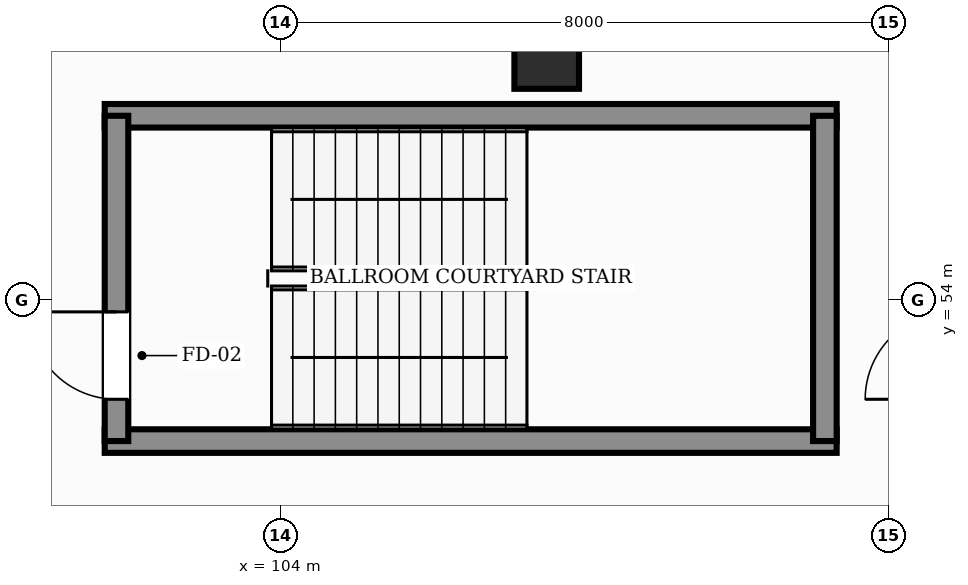
"""IFC4 building model, lengths in metres.
Left out: names, types, materials, properties, quantities, classifications, styles, units other than length and angle.
Written with IfcOpenShell. Run it as: python <this file> out.ifc"""

import sys

from ifc_helpers import new_model, si_unit, direction, frame, frame_2d, origin, origin_2d, place, context, subcontext, project, spatial, rectangle, extrude, element, fill, save


model = new_model("IFC4")
c1 = context("Model", 3, precision=1e-05, world=origin(), true_north=direction((0.0, 1.0)))
c2 = subcontext(c1, "Body", "Model", "MODEL_VIEW")
j1 = project(units=[si_unit("LENGTHUNIT", "METRE"), si_unit("PLANEANGLEUNIT", "RADIAN")], contexts=[c1])
p1 = place(None, origin())
s1 = spatial("IfcSite", under=j1, at=p1, CompositionType="ELEMENT")
p2 = place(p1, origin())
s2 = spatial("IfcBuilding", under=s1, at=p2, CompositionType="ELEMENT")
p3 = place(p2, frame((0.0, 0.0, -4.8)))
s3 = spatial("IfcBuildingStorey", under=s2, at=p3, CompositionType="ELEMENT", Elevation=-4.8)
p4 = place(p3, frame((107.5, 57.2, 0.0), z_axis=(0.0, 0.0, 1.0), x_axis=(1.0, 0.0, 0.0)))
e1 = element("IfcColumn", 1, at=p4, inside=s3, PredefinedType="COLUMN", context=c2, shape_type="SweptSolid", body=[
    extrude(rectangle(XDim=0.85, YDim=0.85, at=origin_2d()), origin(), (0.0, 0.0, 1.0), 4.8),
])
for number, where, z_axis, x_axis in (
    (2, (101.685, 52.14, 0.0), (0.0, 0.0, 1.0), (1.0, 0.0, 0.0)),
    (3, (101.685, 56.42, 0.0), (0.0, 0.0, 1.0), (1.0, 0.0, 0.0)),
):
    element("IfcWall", number, at=place(p3, frame(where, z_axis=z_axis, x_axis=x_axis)), inside=s3, PredefinedType="SHEAR", context=c2, shape_type="SweptSolid", body=[
        extrude(rectangle(XDim=9.63, YDim=0.31, at=frame_2d((4.815, 0.0))), origin(), (0.0, 0.0, 1.0), 4.8),
    ])
p5 = place(p3, frame((101.84, 52.14, 0.0), z_axis=(0.0, 0.0, 1.0), x_axis=(0.0, 1.0, 0.0)))
e4 = element("IfcWall", 4, at=p5, inside=s3, PredefinedType="SHEAR", context=c2, shape_type="SweptSolid", body=[
    extrude(rectangle(XDim=4.28, YDim=0.31, at=frame_2d((2.14, 0.0))), origin(), (0.0, 0.0, 1.0), 4.8),
])
p6 = place(p5, frame((0.55, 0.0, 0.0)))
e5 = element("IfcOpeningElement", 5, at=p6, cuts=e4, PredefinedType="OPENING", context=c2, shape_type="SweptSolid", body=[
    extrude(rectangle(XDim=1.15, YDim=2.2, at=frame_2d((0.575, 1.1))), frame((0.0, 0.165, 0.0), z_axis=(0.0, -1.0, 0.0), x_axis=(1.0, 0.0, 0.0)), (0.0, 0.0, 1.0), 0.33),
])
p7 = place(p3, frame((111.16, 52.14, 0.0), z_axis=(0.0, 0.0, 1.0), x_axis=(0.0, 1.0, 0.0)))
e6 = element("IfcWall", 6, at=p7, inside=s3, PredefinedType="SHEAR", context=c2, shape_type="SweptSolid", body=[
    extrude(rectangle(XDim=4.28, YDim=0.31, at=frame_2d((2.14, 0.0))), origin(), (0.0, 0.0, 1.0), 4.8),
])
p8 = place(p6, origin())
e7 = element("IfcDoor", 7, at=p8, inside=s3, OperationType="SINGLE_SWING_RIGHT", PredefinedType="DOOR", context=c2, shape_type="SweptSolid", body=[
    extrude(rectangle(XDim=1.15, YDim=2.2, at=frame_2d((0.575, 1.1))), frame((0.0, 0.025, 0.0), z_axis=(0.0, -1.0, 0.0), x_axis=(1.0, 0.0, 0.0)), (0.0, 0.0, 1.0), 0.05),
])
fill(e5, e7)
save(model, sys.argv[1])
